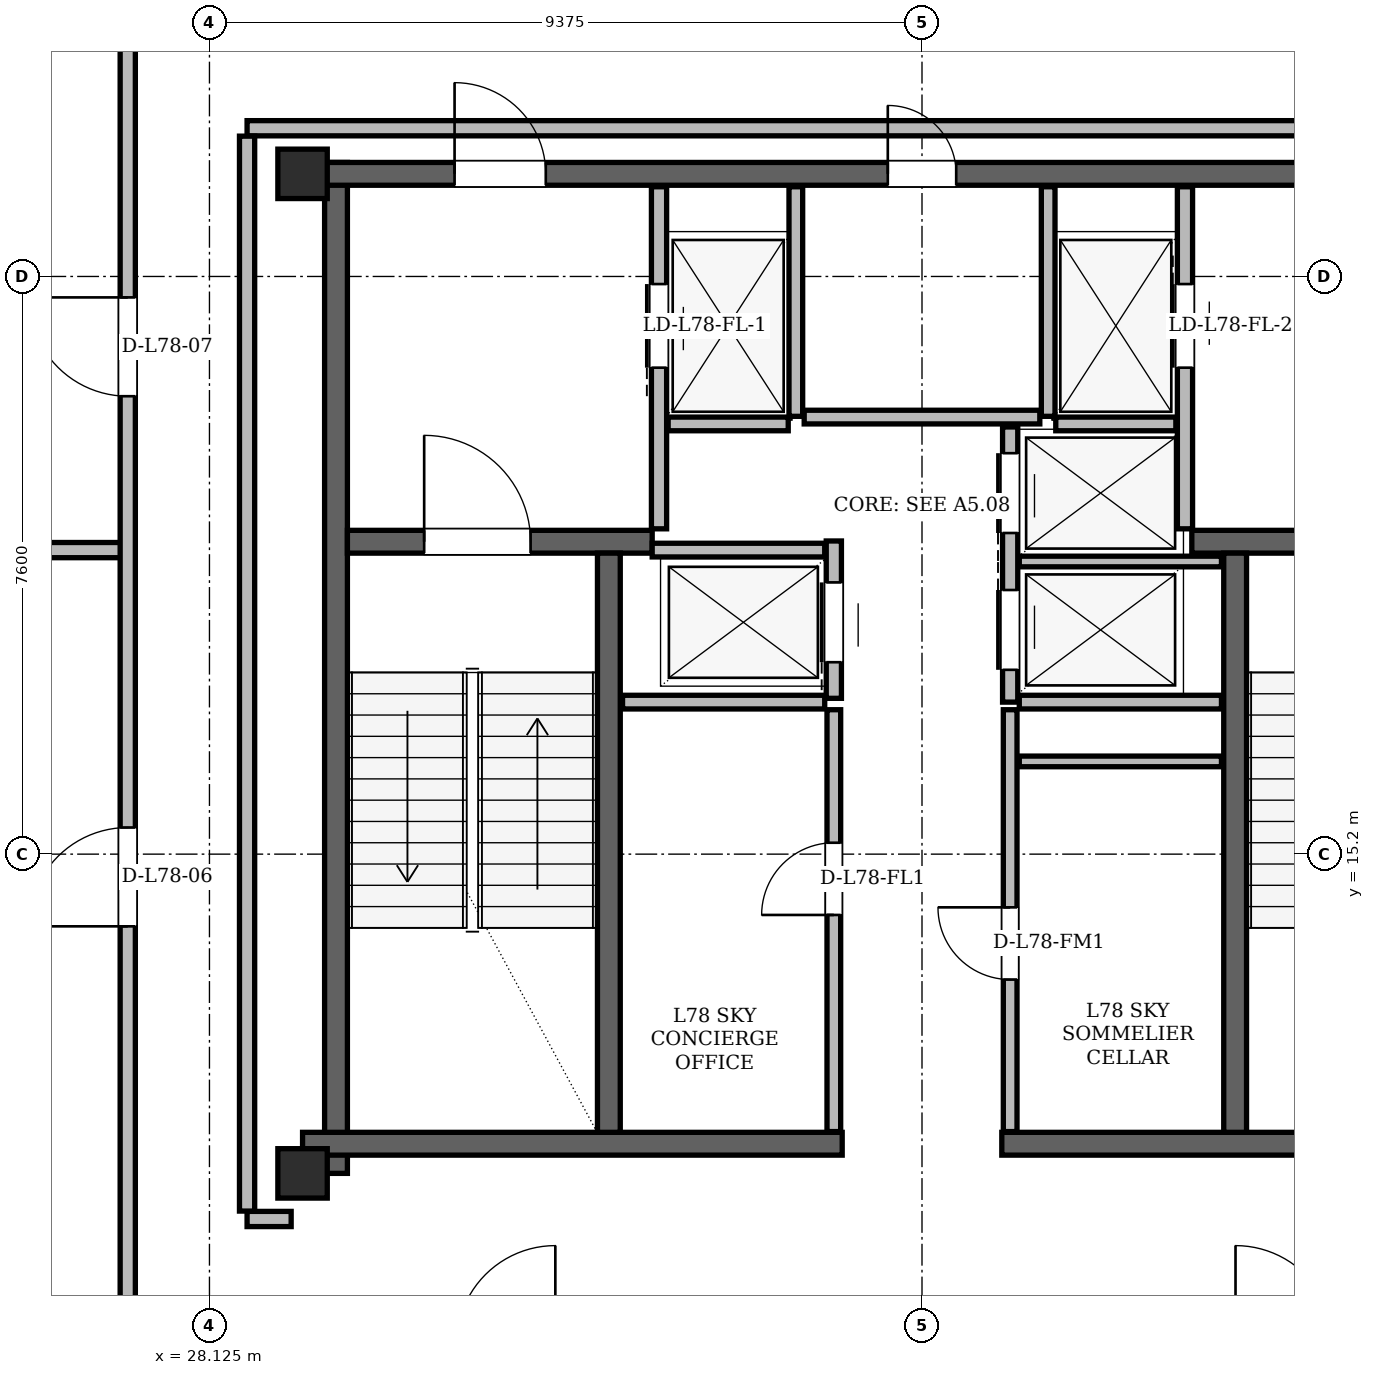
"""IFC4 building model, lengths in metres.
Left out: names, types, materials, properties, quantities, classifications, styles, units other than length and angle.
Written with IfcOpenShell. Run it as: python <this file> out.ifc"""

import sys

from ifc_helpers import new_model, si_unit, direction, frame, frame_2d, origin, origin_2d, place, context, subcontext, project, spatial, rectangle, hollow_rectangle, extrude, element, fill, save


model = new_model("IFC4")
c1 = context("Model", 3, precision=1e-05, world=origin(), true_north=direction((0.0, 1.0)))
c2 = subcontext(c1, "Body", "Model", "MODEL_VIEW")
j1 = project(units=[si_unit("LENGTHUNIT", "METRE"), si_unit("PLANEANGLEUNIT", "RADIAN")], contexts=[c1])
p1 = place(None, origin())
s1 = spatial("IfcSite", under=j1, at=p1, CompositionType="ELEMENT")
p2 = place(p1, origin())
s2 = spatial("IfcBuilding", under=s1, at=p2, CompositionType="ELEMENT")
p3 = place(p2, frame((0.0, 0.0, 296.7)))
s3 = spatial("IfcBuildingStorey", under=s2, at=p3, CompositionType="ELEMENT", Elevation=296.7)
for number, where, z_axis, x_axis in (
    (1, (29.35, 11.0, 0.0), (0.0, 0.0, 1.0), (1.0, 0.0, 0.0)),
    (2, (29.35, 24.15, 0.0), (0.0, 0.0, 1.0), (1.0, 0.0, 0.0)),
):
    element("IfcColumn", number, at=place(p3, frame(where, z_axis=z_axis, x_axis=x_axis)), inside=s3, PredefinedType="COLUMN", context=c2, shape_type="SweptSolid", body=[
        extrude(hollow_rectangle(XDim=0.65, YDim=0.65, WallThickness=0.05, at=origin_2d()), origin(), (0.0, 0.0, 1.0), 4.5),
    ])
p4 = place(p3, frame((29.79, 11.0, 0.0), z_axis=(0.0, 0.0, 1.0), x_axis=(0.0, 1.0, 0.0)))
e3 = element("IfcWall", 3, at=p4, inside=s3, PredefinedType="SHEAR", context=c2, shape_type="SweptSolid", body=[
    extrude(rectangle(XDim=13.3, YDim=0.3, at=frame_2d((6.65, 0.0))), origin(), (0.0, 0.0, 1.0), 4.28),
])
for number, where, z_axis, x_axis in (
    (4, (29.35, 11.39, 0.0), (0.0, 0.0, 1.0), (1.0, 0.0, 0.0)),
    (5, (38.55, 11.39, 0.0), (0.0, 0.0, 1.0), (1.0, 0.0, 0.0)),
):
    element("IfcWall", number, at=place(p3, frame(where, z_axis=z_axis, x_axis=x_axis)), inside=s3, PredefinedType="SHEAR", context=c2, shape_type="SweptSolid", body=[
        extrude(rectangle(XDim=7.1, YDim=0.3, at=frame_2d((3.55, 0.0))), origin(), (0.0, 0.0, 1.0), 4.28),
    ])
p5 = place(p3, frame((29.65, 24.15, 0.0), z_axis=(0.0, 0.0, 1.0), x_axis=(1.0, 0.0, 0.0)))
e6 = element("IfcWall", 6, at=p5, inside=s3, PredefinedType="SHEAR", context=c2, shape_type="SweptSolid", body=[
    extrude(rectangle(XDim=15.7, YDim=0.3, at=frame_2d((7.85, 0.0))), origin(), (0.0, 0.0, 1.0), 4.28),
])
p6 = place(p5, frame((1.7, 0.0, 0.0)))
e7 = element("IfcOpeningElement", 7, at=p6, cuts=e6, PredefinedType="OPENING", context=c2, shape_type="SweptSolid", body=[
    extrude(rectangle(XDim=1.2, YDim=2.2, at=frame_2d((0.6, 1.1))), frame((0.0, 0.15, 0.0), z_axis=(0.0, -1.0, 0.0), x_axis=(1.0, 0.0, 0.0)), (0.0, 0.0, 1.0), 0.3),
])
p7 = place(p5, frame((12.8, 0.0, 0.0)))
e8 = element("IfcOpeningElement", 8, at=p7, cuts=e6, PredefinedType="OPENING", context=c2, shape_type="SweptSolid", body=[
    extrude(rectangle(XDim=1.2, YDim=2.2, at=frame_2d((0.6, 1.1))), frame((0.0, 0.15, 0.0), z_axis=(0.0, -1.0, 0.0), x_axis=(1.0, 0.0, 0.0)), (0.0, 0.0, 1.0), 0.3),
])
p8 = place(p5, frame((7.4, 0.0, 0.0)))
e9 = element("IfcOpeningElement", 9, at=p8, cuts=e6, PredefinedType="OPENING", context=c2, shape_type="SweptSolid", body=[
    extrude(rectangle(XDim=0.9, YDim=2.05, at=frame_2d((0.45, 1.025))), frame((0.0, 0.15, 0.0), z_axis=(0.0, -1.0, 0.0), x_axis=(1.0, 0.0, 0.0)), (0.0, 0.0, 1.0), 0.3),
])
p9 = place(p3, frame((29.94, 19.31, 0.0), z_axis=(0.0, 0.0, 1.0), x_axis=(1.0, 0.0, 0.0)))
e10 = element("IfcWall", 10, at=p9, inside=s3, PredefinedType="SHEAR", context=c2, shape_type="SweptSolid", body=[
    extrude(rectangle(XDim=4.01, YDim=0.3, at=frame_2d((2.005, 0.0))), origin(), (0.0, 0.0, 1.0), 4.28),
])
p10 = place(p9, frame((1.01, 0.0, 0.0)))
e11 = element("IfcOpeningElement", 11, at=p10, cuts=e10, PredefinedType="OPENING", context=c2, shape_type="SweptSolid", body=[
    extrude(rectangle(XDim=1.4, YDim=2.2, at=frame_2d((0.7, 1.1))), frame((0.0, 0.15, 0.0), z_axis=(0.0, -1.0, 0.0), x_axis=(1.0, 0.0, 0.0)), (0.0, 0.0, 1.0), 0.3),
])
p11 = place(p3, frame((41.05, 19.31, 0.0), z_axis=(0.0, 0.0, 1.0), x_axis=(1.0, 0.0, 0.0)))
e12 = element("IfcWall", 12, at=p11, inside=s3, PredefinedType="SHEAR", context=c2, shape_type="SweptSolid", body=[
    extrude(rectangle(XDim=4.01, YDim=0.3, at=frame_2d((2.005, 0.0))), origin(), (0.0, 0.0, 1.0), 4.28),
])
p12 = place(p11, frame((1.6, 0.0, 0.0)))
e13 = element("IfcOpeningElement", 13, at=p12, cuts=e12, PredefinedType="OPENING", context=c2, shape_type="SweptSolid", body=[
    extrude(rectangle(XDim=1.4, YDim=2.2, at=frame_2d((0.7, 1.1))), frame((0.0, 0.15, 0.0), z_axis=(0.0, -1.0, 0.0), x_axis=(1.0, 0.0, 0.0)), (0.0, 0.0, 1.0), 0.3),
])
for number, where, z_axis, x_axis in (
    (14, (33.38, 11.54, 0.0), (0.0, 0.0, 1.0), (0.0, 1.0, 0.0)),
    (15, (41.62, 11.54, 0.0), (0.0, 0.0, 1.0), (0.0, 1.0, 0.0)),
):
    element("IfcWall", number, at=place(p3, frame(where, z_axis=z_axis, x_axis=x_axis)), inside=s3, PredefinedType="SHEAR", context=c2, shape_type="SweptSolid", body=[
        extrude(rectangle(XDim=7.62, YDim=0.3, at=frame_2d((3.81, 0.0))), origin(), (0.0, 0.0, 1.0), 4.28),
    ])
p13 = place(p3, frame((34.04, 19.48, 0.0), z_axis=(0.0, 0.0, 1.0), x_axis=(0.0, 1.0, 0.0)))
e16 = element("IfcWall", 16, at=p13, inside=s3, PredefinedType="PARTITIONING", context=c2, shape_type="SweptSolid", body=[
    extrude(rectangle(XDim=4.5, YDim=0.2, at=frame_2d((2.25, 0.0))), origin(), (0.0, 0.0, 1.0), 4.28),
])
p14 = place(p13, frame((2.12, 0.0, 0.0)))
e17 = element("IfcOpeningElement", 17, at=p14, cuts=e16, PredefinedType="OPENING", context=c2, shape_type="SweptSolid", body=[
    extrude(rectangle(XDim=1.1, YDim=2.2, at=frame_2d((0.55, 1.1))), frame((0.0, 0.1, 0.0), z_axis=(0.0, -1.0, 0.0), x_axis=(1.0, 0.0, 0.0)), (0.0, 0.0, 1.0), 0.2),
])
p15 = place(p3, frame((35.84, 20.96, 0.0), z_axis=(0.0, 0.0, 1.0), x_axis=(0.0, 1.0, 0.0)))
e18 = element("IfcWall", 18, at=p15, inside=s3, PredefinedType="PARTITIONING", context=c2, shape_type="SweptSolid", body=[
    extrude(rectangle(XDim=3.02, YDim=0.18, at=frame_2d((1.51, 0.0))), origin(), (0.0, 0.0, 1.0), 4.28),
])
p16 = place(p3, frame((34.16, 20.86, 0.0), z_axis=(0.0, 0.0, 1.0), x_axis=(1.0, 0.0, 0.0)))
e19 = element("IfcWall", 19, at=p16, inside=s3, PredefinedType="PARTITIONING", context=c2, shape_type="SweptSolid", body=[
    extrude(rectangle(XDim=1.58, YDim=0.18, at=frame_2d((0.79, 0.0))), origin(), (0.0, 0.0, 1.0), 4.28),
])
p17 = place(p3, frame((40.96, 19.48, 0.0), z_axis=(0.0, 0.0, 1.0), x_axis=(0.0, 1.0, 0.0)))
e20 = element("IfcWall", 20, at=p17, inside=s3, PredefinedType="PARTITIONING", context=c2, shape_type="SweptSolid", body=[
    extrude(rectangle(XDim=4.5, YDim=0.2, at=frame_2d((2.25, 0.0))), origin(), (0.0, 0.0, 1.0), 4.28),
])
p18 = place(p17, frame((2.12, 0.0, 0.0)))
e21 = element("IfcOpeningElement", 21, at=p18, cuts=e20, PredefinedType="OPENING", context=c2, shape_type="SweptSolid", body=[
    extrude(rectangle(XDim=1.1, YDim=2.2, at=frame_2d((0.55, 1.1))), frame((0.0, 0.1, 0.0), z_axis=(0.0, -1.0, 0.0), x_axis=(1.0, 0.0, 0.0)), (0.0, 0.0, 1.0), 0.2),
])
p19 = place(p3, frame((39.16, 20.96, 0.0), z_axis=(0.0, 0.0, 1.0), x_axis=(0.0, 1.0, 0.0)))
e22 = element("IfcWall", 22, at=p19, inside=s3, PredefinedType="PARTITIONING", context=c2, shape_type="SweptSolid", body=[
    extrude(rectangle(XDim=3.02, YDim=0.18, at=frame_2d((1.51, 0.0))), origin(), (0.0, 0.0, 1.0), 4.28),
])
p20 = place(p3, frame((39.26, 20.86, 0.0), z_axis=(0.0, 0.0, 1.0), x_axis=(1.0, 0.0, 0.0)))
e23 = element("IfcWall", 23, at=p20, inside=s3, PredefinedType="PARTITIONING", context=c2, shape_type="SweptSolid", body=[
    extrude(rectangle(XDim=1.58, YDim=0.18, at=frame_2d((0.79, 0.0))), origin(), (0.0, 0.0, 1.0), 4.28),
])
p21 = place(p3, frame((36.34, 17.25, 0.0), z_axis=(0.0, 0.0, 1.0), x_axis=(0.0, 1.0, 0.0)))
e24 = element("IfcWall", 24, at=p21, inside=s3, PredefinedType="PARTITIONING", context=c2, shape_type="SweptSolid", body=[
    extrude(rectangle(XDim=2.07, YDim=0.2, at=frame_2d((1.035, 0.0))), origin(), (0.0, 0.0, 1.0), 4.28),
])
p22 = place(p21, frame((0.475, 0.0, 0.0)))
e25 = element("IfcOpeningElement", 25, at=p22, cuts=e24, PredefinedType="OPENING", context=c2, shape_type="SweptSolid", body=[
    extrude(rectangle(XDim=1.05, YDim=2.15, at=frame_2d((0.525, 1.075))), frame((0.0, 0.1, 0.0), z_axis=(0.0, -1.0, 0.0), x_axis=(1.0, 0.0, 0.0)), (0.0, 0.0, 1.0), 0.2),
])
p23 = place(p3, frame((33.95, 19.2, 0.0), z_axis=(0.0, 0.0, 1.0), x_axis=(1.0, 0.0, 0.0)))
e26 = element("IfcWall", 26, at=p23, inside=s3, PredefinedType="PARTITIONING", context=c2, shape_type="SweptSolid", body=[
    extrude(rectangle(XDim=2.27, YDim=0.18, at=frame_2d((1.135, 0.0))), origin(), (0.0, 0.0, 1.0), 4.28),
])
p24 = place(p3, frame((33.56, 17.2, 0.0), z_axis=(0.0, 0.0, 1.0), x_axis=(1.0, 0.0, 0.0)))
e27 = element("IfcWall", 27, at=p24, inside=s3, PredefinedType="PARTITIONING", context=c2, shape_type="SweptSolid", body=[
    extrude(rectangle(XDim=2.66, YDim=0.18, at=frame_2d((1.33, 0.0))), origin(), (0.0, 0.0, 1.0), 4.28),
])
p25 = place(p3, frame((36.34, 11.55, 0.0), z_axis=(0.0, 0.0, 1.0), x_axis=(0.0, 1.0, 0.0)))
e28 = element("IfcWall", 28, at=p25, inside=s3, PredefinedType="PARTITIONING", context=c2, shape_type="SweptSolid", body=[
    extrude(rectangle(XDim=5.55, YDim=0.18, at=frame_2d((2.775, 0.0))), origin(), (0.0, 0.0, 1.0), 4.28),
])
p26 = place(p25, frame((2.85, 0.0, 0.0)))
e29 = element("IfcOpeningElement", 29, at=p26, cuts=e28, PredefinedType="OPENING", context=c2, shape_type="SweptSolid", body=[
    extrude(rectangle(XDim=0.95, YDim=2.1, at=frame_2d((0.475, 1.05))), frame((0.0, 0.09, 0.0), z_axis=(0.0, -1.0, 0.0), x_axis=(1.0, 0.0, 0.0)), (0.0, 0.0, 1.0), 0.18),
])
p27 = place(p3, frame((38.66, 17.2, 0.0), z_axis=(0.0, 0.0, 1.0), x_axis=(0.0, 1.0, 0.0)))
e30 = element("IfcWall", 30, at=p27, inside=s3, PredefinedType="PARTITIONING", context=c2, shape_type="SweptSolid", body=[
    extrude(rectangle(XDim=3.62, YDim=0.2, at=frame_2d((1.81, 0.0))), origin(), (0.0, 0.0, 1.0), 4.28),
])
p28 = place(p27, frame((0.425, 0.0, 0.0)))
e31 = element("IfcOpeningElement", 31, at=p28, cuts=e30, PredefinedType="OPENING", context=c2, shape_type="SweptSolid", body=[
    extrude(rectangle(XDim=1.05, YDim=2.15, at=frame_2d((0.525, 1.075))), frame((0.0, 0.1, 0.0), z_axis=(0.0, -1.0, 0.0), x_axis=(1.0, 0.0, 0.0)), (0.0, 0.0, 1.0), 0.2),
])
p29 = place(p27, frame((2.225, 0.0, 0.0)))
e32 = element("IfcOpeningElement", 32, at=p29, cuts=e30, PredefinedType="OPENING", context=c2, shape_type="SweptSolid", body=[
    extrude(rectangle(XDim=1.05, YDim=2.15, at=frame_2d((0.525, 1.075))), frame((0.0, 0.1, 0.0), z_axis=(0.0, -1.0, 0.0), x_axis=(1.0, 0.0, 0.0)), (0.0, 0.0, 1.0), 0.2),
])
p30 = place(p3, frame((38.78, 17.2, 0.0), z_axis=(0.0, 0.0, 1.0), x_axis=(1.0, 0.0, 0.0)))
e33 = element("IfcWall", 33, at=p30, inside=s3, PredefinedType="PARTITIONING", context=c2, shape_type="SweptSolid", body=[
    extrude(rectangle(XDim=2.66, YDim=0.18, at=frame_2d((1.33, 0.0))), origin(), (0.0, 0.0, 1.0), 4.28),
])
p31 = place(p3, frame((38.78, 19.05, 0.0), z_axis=(0.0, 0.0, 1.0), x_axis=(1.0, 0.0, 0.0)))
e34 = element("IfcWall", 34, at=p31, inside=s3, PredefinedType="PARTITIONING", context=c2, shape_type="SweptSolid", body=[
    extrude(rectangle(XDim=2.66, YDim=0.14, at=frame_2d((1.33, 0.0))), origin(), (0.0, 0.0, 1.0), 4.28),
])
p32 = place(p3, frame((38.66, 11.55, 0.0), z_axis=(0.0, 0.0, 1.0), x_axis=(0.0, 1.0, 0.0)))
e35 = element("IfcWall", 35, at=p32, inside=s3, PredefinedType="PARTITIONING", context=c2, shape_type="SweptSolid", body=[
    extrude(rectangle(XDim=5.55, YDim=0.18, at=frame_2d((2.775, 0.0))), origin(), (0.0, 0.0, 1.0), 4.28),
])
p33 = place(p32, frame((2.0, 0.0, 0.0)))
e36 = element("IfcOpeningElement", 36, at=p33, cuts=e35, PredefinedType="OPENING", context=c2, shape_type="SweptSolid", body=[
    extrude(rectangle(XDim=0.95, YDim=2.1, at=frame_2d((0.475, 1.05))), frame((0.0, 0.09, 0.0), z_axis=(0.0, -1.0, 0.0), x_axis=(1.0, 0.0, 0.0)), (0.0, 0.0, 1.0), 0.18),
])
p34 = place(p3, frame((38.78, 16.42, 0.0), z_axis=(0.0, 0.0, 1.0), x_axis=(1.0, 0.0, 0.0)))
e37 = element("IfcWall", 37, at=p34, inside=s3, PredefinedType="PARTITIONING", context=c2, shape_type="SweptSolid", body=[
    extrude(rectangle(XDim=2.66, YDim=0.14, at=frame_2d((1.33, 0.0))), origin(), (0.0, 0.0, 1.0), 4.28),
])
p35 = place(p3, frame((35.95, 20.95, 0.0), z_axis=(0.0, 0.0, 1.0), x_axis=(1.0, 0.0, 0.0)))
e38 = element("IfcWall", 38, at=p35, inside=s3, PredefinedType="PARTITIONING", context=c2, shape_type="SweptSolid", body=[
    extrude(rectangle(XDim=3.1, YDim=0.18, at=frame_2d((1.55, 0.0))), origin(), (0.0, 0.0, 1.0), 4.28),
])
p36 = place(p3, frame((28.62, 10.4, 0.0), z_axis=(0.0, 0.0, 1.0), x_axis=(1.0, 0.0, 0.0)))
e39 = element("IfcWall", 39, at=p36, inside=s3, PredefinedType="PARTITIONING", context=c2, shape_type="SweptSolid", body=[
    extrude(rectangle(XDim=0.58, YDim=0.2, at=frame_2d((0.29, 0.0))), origin(), (0.0, 0.0, 1.0), 4.28),
])
p37 = place(p3, frame((21.958, 19.2, 0.0), z_axis=(0.0, 0.0, 1.0), x_axis=(1.0, 0.0, 0.0)))
e40 = element("IfcWall", 40, at=p37, inside=s3, PredefinedType="PARTITIONING", context=c2, shape_type="SweptSolid", body=[
    extrude(rectangle(XDim=5.092, YDim=0.2, at=frame_2d((2.546, 0.0))), origin(), (0.0, 0.0, 1.0), 4.28),
])
p38 = place(p3, frame((28.62, 24.75, 0.0), z_axis=(0.0, 0.0, 1.0), x_axis=(1.0, 0.0, 0.0)))
e41 = element("IfcWall", 41, at=p38, inside=s3, PredefinedType="PARTITIONING", context=c2, shape_type="SweptSolid", body=[
    extrude(rectangle(XDim=17.76, YDim=0.2, at=frame_2d((8.88, 0.0))), origin(), (0.0, 0.0, 1.0), 3.866),
])
p39 = place(p3, frame((27.05, 8.854, 0.0), z_axis=(0.0, 0.0, 1.0), x_axis=(0.0, 1.0, 0.0)))
e42 = element("IfcWall", 42, at=p39, inside=s3, PredefinedType="PARTITIONING", context=c2, shape_type="SweptSolid", body=[
    extrude(rectangle(XDim=19.303, YDim=0.2, at=frame_2d((9.652, 0.0))), origin(), (0.0, 0.0, 1.0), 3.658),
])
p40 = place(p39, frame((5.396, 0.0, 0.0)))
e43 = element("IfcOpeningElement", 43, at=p40, cuts=e42, PredefinedType="OPENING", context=c2, shape_type="SweptSolid", body=[
    extrude(rectangle(XDim=1.3, YDim=2.2, at=frame_2d((0.65, 1.1))), frame((0.0, 0.1, 0.0), z_axis=(0.0, -1.0, 0.0), x_axis=(1.0, 0.0, 0.0)), (0.0, 0.0, 1.0), 0.2),
])
p41 = place(p39, frame((12.371, 0.0, 0.0)))
e44 = element("IfcOpeningElement", 44, at=p41, cuts=e42, PredefinedType="OPENING", context=c2, shape_type="SweptSolid", body=[
    extrude(rectangle(XDim=1.3, YDim=2.2, at=frame_2d((0.65, 1.1))), frame((0.0, 0.1, 0.0), z_axis=(0.0, -1.0, 0.0), x_axis=(1.0, 0.0, 0.0)), (0.0, 0.0, 1.0), 0.2),
])
p42 = place(p3, frame((28.62, 10.504, 0.0), z_axis=(0.0, 0.0, 1.0), x_axis=(0.0, 1.0, 0.0)))
e45 = element("IfcWall", 45, at=p42, inside=s3, PredefinedType="PARTITIONING", context=c2, shape_type="SweptSolid", body=[
    extrude(rectangle(XDim=14.142, YDim=0.2, at=frame_2d((7.071, 0.0))), origin(), (0.0, 0.0, 1.0), 3.866),
])
p43 = place(p26, origin())
e46 = element("IfcDoor", 46, at=p43, inside=s3, OperationType="SINGLE_SWING_LEFT", PredefinedType="DOOR", context=c2, shape_type="SweptSolid", body=[
    extrude(rectangle(XDim=0.95, YDim=2.1, at=frame_2d((0.475, 1.05))), frame((0.0, 0.025, 0.0), z_axis=(0.0, -1.0, 0.0), x_axis=(1.0, 0.0, 0.0)), (0.0, 0.0, 1.0), 0.05),
])
fill(e29, e46)
p44 = place(p33, origin())
e47 = element("IfcDoor", 47, at=p44, inside=s3, OperationType="SINGLE_SWING_RIGHT", PredefinedType="DOOR", context=c2, shape_type="SweptSolid", body=[
    extrude(rectangle(XDim=0.95, YDim=2.1, at=frame_2d((0.475, 1.05))), frame((0.0, 0.025, 0.0), z_axis=(0.0, -1.0, 0.0), x_axis=(1.0, 0.0, 0.0)), (0.0, 0.0, 1.0), 0.05),
])
fill(e36, e47)
p45 = place(p14, origin())
e48 = element("IfcDoor", 48, at=p45, inside=s3, OperationType="SLIDING_TO_LEFT", PredefinedType="DOOR", context=c2, shape_type="SweptSolid", body=[
    extrude(rectangle(XDim=1.1, YDim=2.2, at=frame_2d((0.55, 1.1))), frame((0.0, 0.025, 0.0), z_axis=(0.0, -1.0, 0.0), x_axis=(1.0, 0.0, 0.0)), (0.0, 0.0, 1.0), 0.05),
])
fill(e17, e48)
p46 = place(p18, origin())
e49 = element("IfcDoor", 49, at=p46, inside=s3, OperationType="SLIDING_TO_RIGHT", PredefinedType="DOOR", context=c2, shape_type="SweptSolid", body=[
    extrude(rectangle(XDim=1.1, YDim=2.2, at=frame_2d((0.55, 1.1))), frame((0.0, 0.025, 0.0), z_axis=(0.0, -1.0, 0.0), x_axis=(1.0, 0.0, 0.0)), (0.0, 0.0, 1.0), 0.05),
])
fill(e21, e49)
p47 = place(p22, origin())
e50 = element("IfcDoor", 50, at=p47, inside=s3, OperationType="SLIDING_TO_LEFT", PredefinedType="DOOR", context=c2, shape_type="SweptSolid", body=[
    extrude(rectangle(XDim=1.05, YDim=2.15, at=frame_2d((0.525, 1.075))), frame((0.0, 0.025, 0.0), z_axis=(0.0, -1.0, 0.0), x_axis=(1.0, 0.0, 0.0)), (0.0, 0.0, 1.0), 0.05),
])
fill(e25, e50)
p48 = place(p28, origin())
e51 = element("IfcDoor", 51, at=p48, inside=s3, OperationType="SLIDING_TO_RIGHT", PredefinedType="DOOR", context=c2, shape_type="SweptSolid", body=[
    extrude(rectangle(XDim=1.05, YDim=2.15, at=frame_2d((0.525, 1.075))), frame((0.0, 0.025, 0.0), z_axis=(0.0, -1.0, 0.0), x_axis=(1.0, 0.0, 0.0)), (0.0, 0.0, 1.0), 0.05),
])
fill(e31, e51)
p49 = place(p29, origin())
e52 = element("IfcDoor", 52, at=p49, inside=s3, OperationType="SLIDING_TO_LEFT", PredefinedType="DOOR", context=c2, shape_type="SweptSolid", body=[
    extrude(rectangle(XDim=1.05, YDim=2.15, at=frame_2d((0.525, 1.075))), frame((0.0, 0.025, 0.0), z_axis=(0.0, -1.0, 0.0), x_axis=(1.0, 0.0, 0.0)), (0.0, 0.0, 1.0), 0.05),
])
fill(e32, e52)
p50 = place(p10, origin())
e53 = element("IfcDoor", 53, at=p50, inside=s3, OperationType="SINGLE_SWING_LEFT", PredefinedType="DOOR", context=c2, shape_type="SweptSolid", body=[
    extrude(rectangle(XDim=1.4, YDim=2.2, at=frame_2d((0.7, 1.1))), frame((0.0, 0.025, 0.0), z_axis=(0.0, -1.0, 0.0), x_axis=(1.0, 0.0, 0.0)), (0.0, 0.0, 1.0), 0.05),
])
fill(e11, e53)
p51 = place(p6, origin())
e54 = element("IfcDoor", 54, at=p51, inside=s3, OperationType="SINGLE_SWING_LEFT", PredefinedType="DOOR", context=c2, shape_type="SweptSolid", body=[
    extrude(rectangle(XDim=1.2, YDim=2.2, at=frame_2d((0.6, 1.1))), frame((0.0, 0.025, 0.0), z_axis=(0.0, -1.0, 0.0), x_axis=(1.0, 0.0, 0.0)), (0.0, 0.0, 1.0), 0.05),
])
fill(e7, e54)
p52 = place(p8, origin())
e55 = element("IfcDoor", 55, at=p52, inside=s3, OperationType="SINGLE_SWING_LEFT", PredefinedType="DOOR", context=c2, shape_type="SweptSolid", body=[
    extrude(rectangle(XDim=0.9, YDim=2.05, at=frame_2d((0.45, 1.025))), frame((0.0, 0.025, 0.0), z_axis=(0.0, -1.0, 0.0), x_axis=(1.0, 0.0, 0.0)), (0.0, 0.0, 1.0), 0.05),
])
fill(e9, e55)
p53 = place(p40, origin())
e56 = element("IfcDoor", 56, at=p53, inside=s3, OperationType="SINGLE_SWING_LEFT", PredefinedType="DOOR", context=c2, shape_type="SweptSolid", body=[
    extrude(rectangle(XDim=1.3, YDim=2.2, at=frame_2d((0.65, 1.1))), frame((0.0, 0.025, 0.0), z_axis=(0.0, -1.0, 0.0), x_axis=(1.0, 0.0, 0.0)), (0.0, 0.0, 1.0), 0.05),
])
fill(e43, e56)
p54 = place(p41, origin())
e57 = element("IfcDoor", 57, at=p54, inside=s3, OperationType="SINGLE_SWING_RIGHT", PredefinedType="DOOR", context=c2, shape_type="SweptSolid", body=[
    extrude(rectangle(XDim=1.3, YDim=2.2, at=frame_2d((0.65, 1.1))), frame((0.0, 0.025, 0.0), z_axis=(0.0, -1.0, 0.0), x_axis=(1.0, 0.0, 0.0)), (0.0, 0.0, 1.0), 0.05),
])
fill(e44, e57)
save(model, sys.argv[1])
